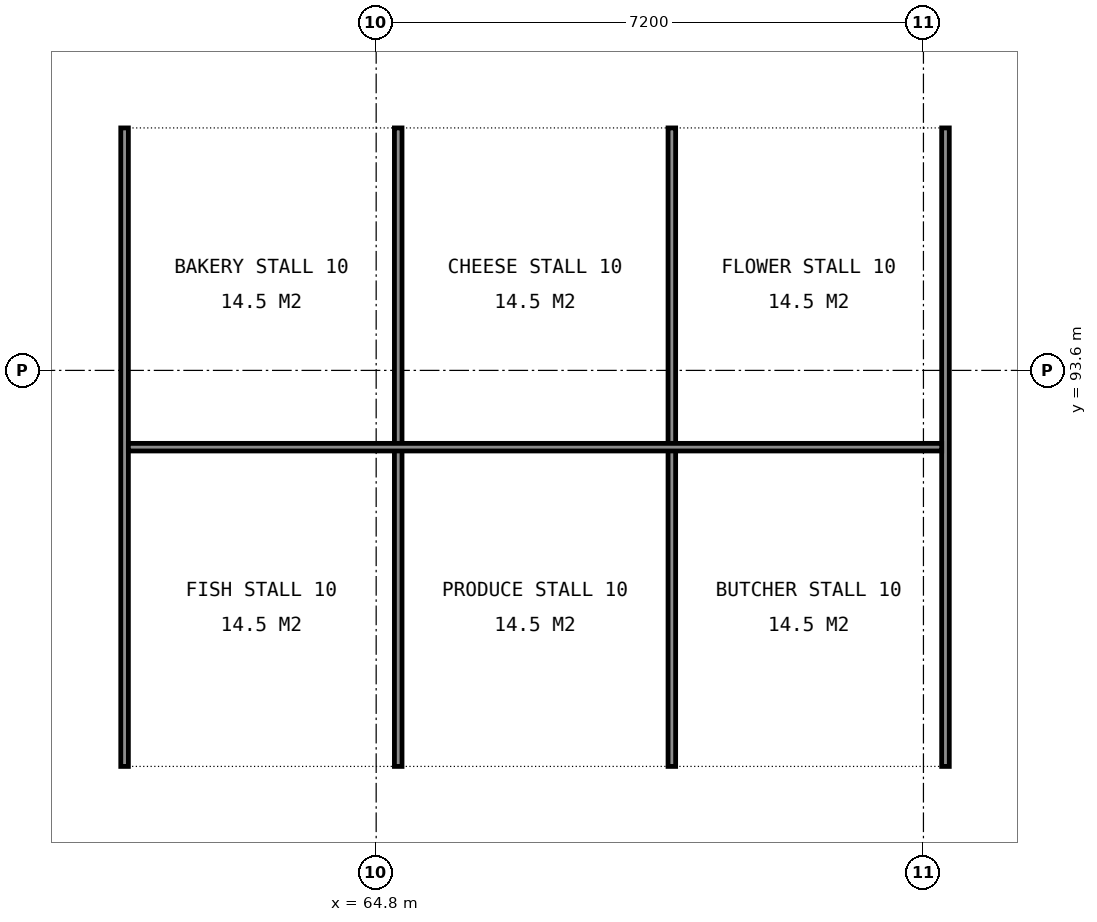
"""IFC4 building model, lengths in metres.
Left out: names, types, materials, properties, quantities, classifications, styles, units other than length and angle.
Written with IfcOpenShell. Run it as: python <this file> out.ifc"""

import sys

from ifc_helpers import new_model, si_unit, direction, frame, frame_2d, origin, place, context, subcontext, project, spatial, rectangle, extrude, element, save


model = new_model("IFC4")
c1 = context("Model", 3, precision=1e-05, world=origin(), true_north=direction((0.0, 1.0)))
c2 = subcontext(c1, "Body", "Model", "MODEL_VIEW")
j1 = project(units=[si_unit("LENGTHUNIT", "METRE"), si_unit("PLANEANGLEUNIT", "RADIAN")], contexts=[c1])
p1 = place(None, origin())
s1 = spatial("IfcSite", under=j1, at=p1, CompositionType="ELEMENT")
p2 = place(p1, origin())
s2 = spatial("IfcBuilding", under=s1, at=p2, CompositionType="ELEMENT")
p3 = place(p2, origin())
s3 = spatial("IfcBuildingStorey", under=s2, at=p3, CompositionType="ELEMENT", Elevation=0.0)
for number, where, z_axis, x_axis in (
    (1, (61.49, 88.39, 0.0), (0.0, 0.0, 1.0), (0.0, 1.0, 0.0)),
    (2, (65.09, 88.39, 0.0), (0.0, 0.0, 1.0), (0.0, 1.0, 0.0)),
    (3, (68.69, 88.39, 0.0), (0.0, 0.0, 1.0), (0.0, 1.0, 0.0)),
    (4, (72.29, 88.39, 0.0), (0.0, 0.0, 1.0), (0.0, 1.0, 0.0)),
):
    element("IfcWall", number, at=place(p3, frame(where, z_axis=z_axis, x_axis=x_axis)), inside=s3, PredefinedType="PARTITIONING", context=c2, shape_type="SweptSolid", body=[
        extrude(rectangle(XDim=8.4, YDim=0.1, at=frame_2d((4.2, 0.0))), origin(), (0.0, 0.0, 1.0), 1.2),
    ])
p4 = place(p3, frame((61.54, 92.59, 0.0), z_axis=(0.0, 0.0, 1.0), x_axis=(1.0, 0.0, 0.0)))
e5 = element("IfcWall", 5, at=p4, inside=s3, PredefinedType="PARTITIONING", context=c2, shape_type="SweptSolid", body=[
    extrude(rectangle(XDim=10.7, YDim=0.1, at=frame_2d((5.35, 0.0))), origin(), (0.0, 0.0, 1.0), 1.2),
])
save(model, sys.argv[1])
